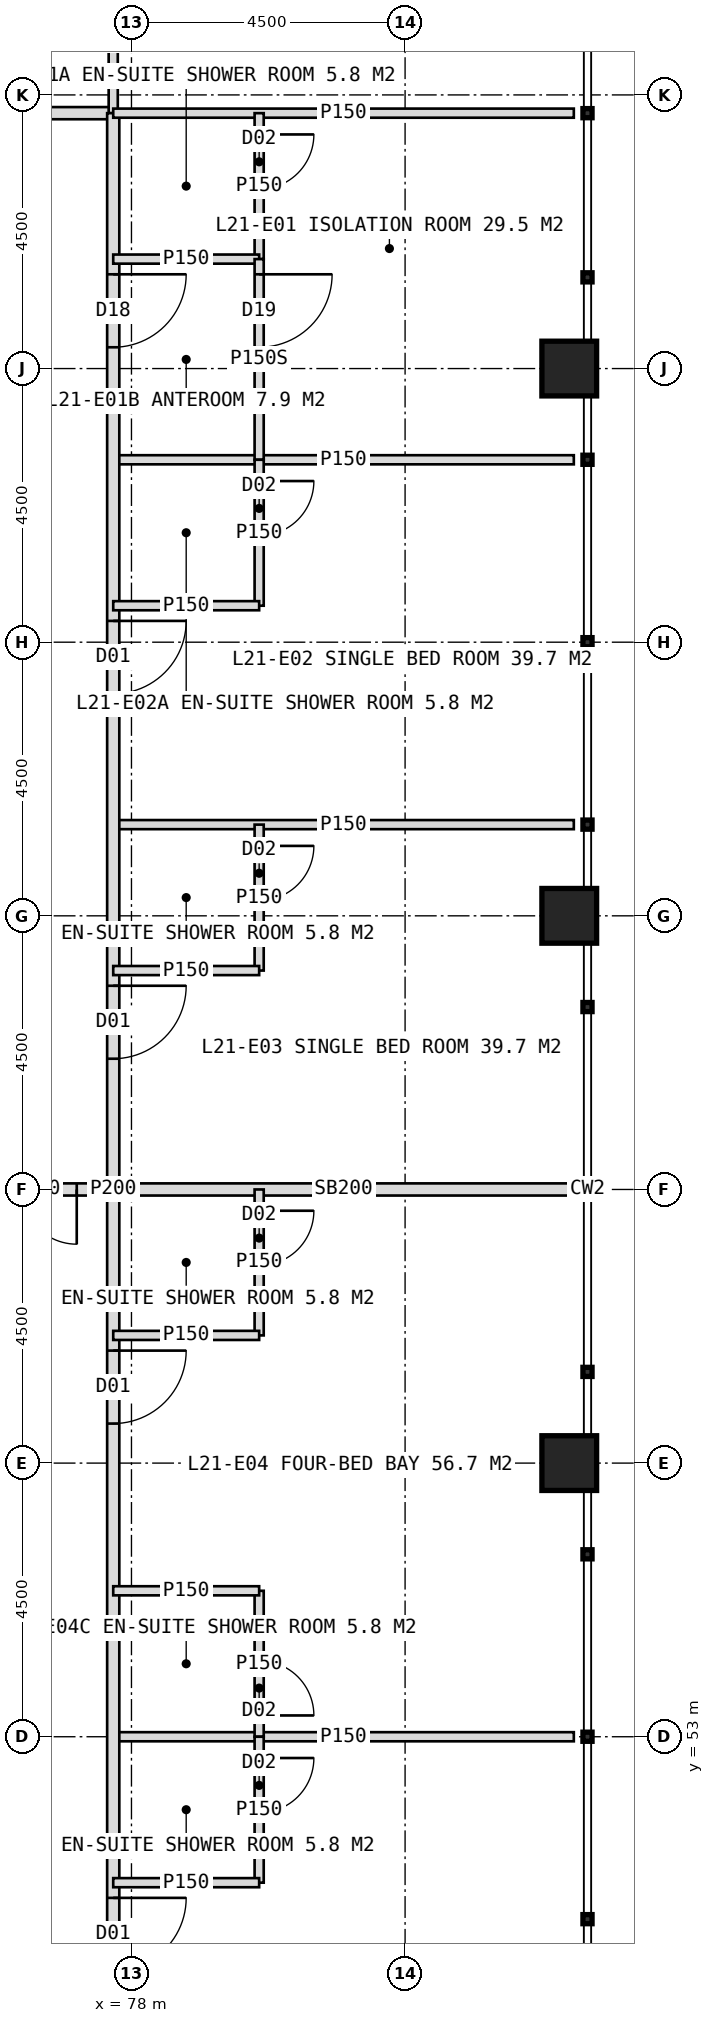
"""IFC4 building model, lengths in metres.
Left out: names, types, materials, properties, quantities, classifications, styles, units other than length and angle.
Written with IfcOpenShell. Run it as: python <this file> out.ifc"""

import sys

from ifc_helpers import new_model, si_unit, direction, frame, frame_2d, origin, origin_2d, place, context, subcontext, project, spatial, rectangle, hollow_rectangle, extrude, element, fill, save


model = new_model("IFC4")
c1 = context("Model", 3, precision=1e-05, world=origin(), true_north=direction((0.0, 1.0)))
c2 = subcontext(c1, "Body", "Model", "MODEL_VIEW")
j1 = project(units=[si_unit("LENGTHUNIT", "METRE"), si_unit("PLANEANGLEUNIT", "RADIAN")], contexts=[c1])
p1 = place(None, origin())
s1 = spatial("IfcSite", under=j1, at=p1, CompositionType="ELEMENT")
p2 = place(p1, origin())
s2 = spatial("IfcBuilding", under=s1, at=p2, CompositionType="ELEMENT")
p3 = place(p2, frame((0.0, 0.0, 91.0)))
s3 = spatial("IfcBuildingStorey", under=s2, at=p3, CompositionType="ELEMENT", Elevation=91.0)
for number, where, z_axis, x_axis in (
    (1, (85.2, 57.5, 0.0), (0.0, 0.0, 1.0), (1.0, 0.0, 0.0)),
    (2, (85.2, 66.5, 0.0), (0.0, 0.0, 1.0), (1.0, 0.0, 0.0)),
    (3, (85.2, 75.5, 0.0), (0.0, 0.0, 1.0), (1.0, 0.0, 0.0)),
):
    element("IfcColumn", number, at=place(p3, frame(where, z_axis=z_axis, x_axis=x_axis)), inside=s3, PredefinedType="COLUMN", context=c2, shape_type="SweptSolid", body=[
        extrude(hollow_rectangle(XDim=0.9, YDim=0.9, WallThickness=0.08, at=origin_2d()), origin(), (0.0, 0.0, 1.0), 4.0),
    ])
p4 = place(p3, frame((42.3, 79.7, 0.0), z_axis=(0.0, 0.0, 1.0), x_axis=(1.0, 0.0, 0.0)))
e4 = element("IfcWall", 4, at=p4, inside=s3, PredefinedType="PARTITIONING", context=c2, shape_type="SweptSolid", body=[
    extrude(rectangle(XDim=35.4, YDim=0.2, at=frame_2d((17.7, 0.0))), origin(), (0.0, 0.0, 1.0), 3.75),
])
p5 = place(p4, frame((2.65, 0.0, 0.0)))
e5 = element("IfcOpeningElement", 5, at=p5, cuts=e4, PredefinedType="OPENING", context=c2, shape_type="SweptSolid", body=[
    extrude(rectangle(XDim=1.2, YDim=2.2, at=frame_2d((0.6, 1.1))), frame((0.0, 0.11, 0.0), z_axis=(0.0, -1.0, 0.0), x_axis=(1.0, 0.0, 0.0)), (0.0, 0.0, 1.0), 0.22),
])
p6 = place(p4, frame((11.2, 0.0, 0.0)))
e6 = element("IfcOpeningElement", 6, at=p6, cuts=e4, PredefinedType="OPENING", context=c2, shape_type="SweptSolid", body=[
    extrude(rectangle(XDim=1.0, YDim=2.1, at=frame_2d((0.5, 1.05))), frame((0.0, 0.11, 0.0), z_axis=(0.0, -1.0, 0.0), x_axis=(1.0, 0.0, 0.0)), (0.0, 0.0, 1.0), 0.22),
])
p7 = place(p4, frame((17.2, 0.0, 0.0)))
e7 = element("IfcOpeningElement", 7, at=p7, cuts=e4, PredefinedType="OPENING", context=c2, shape_type="SweptSolid", body=[
    extrude(rectangle(XDim=1.0, YDim=2.1, at=frame_2d((0.5, 1.05))), frame((0.0, 0.11, 0.0), z_axis=(0.0, -1.0, 0.0), x_axis=(1.0, 0.0, 0.0)), (0.0, 0.0, 1.0), 0.22),
])
p8 = place(p4, frame((23.35, 0.0, 0.0)))
e8 = element("IfcOpeningElement", 8, at=p8, cuts=e4, PredefinedType="OPENING", context=c2, shape_type="SweptSolid", body=[
    extrude(rectangle(XDim=1.2, YDim=2.2, at=frame_2d((0.6, 1.1))), frame((0.0, 0.11, 0.0), z_axis=(0.0, -1.0, 0.0), x_axis=(1.0, 0.0, 0.0)), (0.0, 0.0, 1.0), 0.22),
])
p9 = place(p4, frame((29.35, 0.0, 0.0)))
e9 = element("IfcOpeningElement", 9, at=p9, cuts=e4, PredefinedType="OPENING", context=c2, shape_type="SweptSolid", body=[
    extrude(rectangle(XDim=1.2, YDim=2.2, at=frame_2d((0.6, 1.1))), frame((0.0, 0.11, 0.0), z_axis=(0.0, -1.0, 0.0), x_axis=(1.0, 0.0, 0.0)), (0.0, 0.0, 1.0), 0.22),
])
p10 = place(p3, frame((77.7, 79.7, 0.0), z_axis=(0.0, 0.0, 1.0), x_axis=(0.0, 1.0, 0.0)))
e10 = element("IfcWall", 10, at=p10, inside=s3, PredefinedType="PARTITIONING", context=c2, shape_type="SweptSolid", body=[
    extrude(rectangle(XDim=2.4, YDim=0.15, at=frame_2d((1.2, 0.0))), origin(), (0.0, 0.0, 1.0), 3.75),
])
for number, where, z_axis, x_axis in (
    (11, (77.7, 74.0, 0.0), (0.0, 0.0, 1.0), (1.0, 0.0, 0.0)),
    (12, (77.7, 68.0, 0.0), (0.0, 0.0, 1.0), (1.0, 0.0, 0.0)),
):
    element("IfcWall", number, at=place(p3, frame(where, z_axis=z_axis, x_axis=x_axis)), inside=s3, PredefinedType="PARTITIONING", context=c2, shape_type="SweptSolid", body=[
        extrude(rectangle(XDim=7.575, YDim=0.15, at=frame_2d((3.788, 0.0))), origin(), (0.0, 0.0, 1.0), 3.75),
    ])
p11 = place(p3, frame((77.7, 62.0, 0.0), z_axis=(0.0, 0.0, 1.0), x_axis=(1.0, 0.0, 0.0)))
e13 = element("IfcWall", 13, at=p11, inside=s3, PredefinedType="SOLIDWALL", context=c2, shape_type="SweptSolid", body=[
    extrude(rectangle(XDim=7.575, YDim=0.2, at=frame_2d((3.788, 0.0))), origin(), (0.0, 0.0, 1.0), 2.75),
])
p12 = place(p3, frame((77.7, 53.0, 0.0), z_axis=(0.0, 0.0, 1.0), x_axis=(1.0, 0.0, 0.0)))
e14 = element("IfcWall", 14, at=p12, inside=s3, PredefinedType="PARTITIONING", context=c2, shape_type="SweptSolid", body=[
    extrude(rectangle(XDim=7.575, YDim=0.15, at=frame_2d((3.788, 0.0))), origin(), (0.0, 0.0, 1.0), 3.75),
])
p13 = place(p3, frame((77.7, 79.7, 0.0), z_axis=(0.0, 0.0, 1.0), x_axis=(0.0, -1.0, 0.0)))
e15 = element("IfcWall", 15, at=p13, inside=s3, PredefinedType="PARTITIONING", context=c2, shape_type="SweptSolid", body=[
    extrude(rectangle(XDim=35.4, YDim=0.2, at=frame_2d((17.7, 0.0))), origin(), (0.0, 0.0, 1.0), 3.75),
])
p14 = place(p13, frame((2.65, 0.0, 0.0)))
e16 = element("IfcOpeningElement", 16, at=p14, cuts=e15, PredefinedType="OPENING", context=c2, shape_type="SweptSolid", body=[
    extrude(rectangle(XDim=1.2, YDim=2.2, at=frame_2d((0.6, 1.1))), frame((0.0, 0.11, 0.0), z_axis=(0.0, -1.0, 0.0), x_axis=(1.0, 0.0, 0.0)), (0.0, 0.0, 1.0), 0.22),
])
p15 = place(p13, frame((8.35, 0.0, 0.0)))
e17 = element("IfcOpeningElement", 17, at=p15, cuts=e15, PredefinedType="OPENING", context=c2, shape_type="SweptSolid", body=[
    extrude(rectangle(XDim=1.2, YDim=2.2, at=frame_2d((0.6, 1.1))), frame((0.0, 0.11, 0.0), z_axis=(0.0, -1.0, 0.0), x_axis=(1.0, 0.0, 0.0)), (0.0, 0.0, 1.0), 0.22),
])
p16 = place(p13, frame((14.35, 0.0, 0.0)))
e18 = element("IfcOpeningElement", 18, at=p16, cuts=e15, PredefinedType="OPENING", context=c2, shape_type="SweptSolid", body=[
    extrude(rectangle(XDim=1.2, YDim=2.2, at=frame_2d((0.6, 1.1))), frame((0.0, 0.11, 0.0), z_axis=(0.0, -1.0, 0.0), x_axis=(1.0, 0.0, 0.0)), (0.0, 0.0, 1.0), 0.22),
])
p17 = place(p13, frame((20.35, 0.0, 0.0)))
e19 = element("IfcOpeningElement", 19, at=p17, cuts=e15, PredefinedType="OPENING", context=c2, shape_type="SweptSolid", body=[
    extrude(rectangle(XDim=1.2, YDim=2.2, at=frame_2d((0.6, 1.1))), frame((0.0, 0.11, 0.0), z_axis=(0.0, -1.0, 0.0), x_axis=(1.0, 0.0, 0.0)), (0.0, 0.0, 1.0), 0.22),
])
p18 = place(p13, frame((29.35, 0.0, 0.0)))
e20 = element("IfcOpeningElement", 20, at=p18, cuts=e15, PredefinedType="OPENING", context=c2, shape_type="SweptSolid", body=[
    extrude(rectangle(XDim=1.2, YDim=2.2, at=frame_2d((0.6, 1.1))), frame((0.0, 0.11, 0.0), z_axis=(0.0, -1.0, 0.0), x_axis=(1.0, 0.0, 0.0)), (0.0, 0.0, 1.0), 0.22),
])
p19 = place(p3, frame((77.7, 79.7, 0.0), z_axis=(0.0, 0.0, 1.0), x_axis=(1.0, 0.0, 0.0)))
e21 = element("IfcWall", 21, at=p19, inside=s3, PredefinedType="PARTITIONING", context=c2, shape_type="SweptSolid", body=[
    extrude(rectangle(XDim=7.575, YDim=0.15, at=frame_2d((3.788, 0.0))), origin(), (0.0, 0.0, 1.0), 3.75),
])
p20 = place(p3, frame((80.1, 79.7, 0.0), z_axis=(0.0, 0.0, 1.0), x_axis=(0.0, -1.0, 0.0)))
e22 = element("IfcWall", 22, at=p20, inside=s3, PredefinedType="PARTITIONING", context=c2, shape_type="SweptSolid", body=[
    extrude(rectangle(XDim=2.4, YDim=0.15, at=frame_2d((1.2, 0.0))), origin(), (0.0, 0.0, 1.0), 3.75),
])
p21 = place(p20, frame((0.35, 0.0, 0.0)))
e23 = element("IfcOpeningElement", 23, at=p21, cuts=e22, PredefinedType="OPENING", context=c2, shape_type="SweptSolid", body=[
    extrude(rectangle(XDim=0.9, YDim=2.1, at=frame_2d((0.45, 1.05))), frame((0.0, 0.085, 0.0), z_axis=(0.0, -1.0, 0.0), x_axis=(1.0, 0.0, 0.0)), (0.0, 0.0, 1.0), 0.17),
])
p22 = place(p3, frame((77.7, 77.3, 0.0), z_axis=(0.0, 0.0, 1.0), x_axis=(1.0, 0.0, 0.0)))
e24 = element("IfcWall", 24, at=p22, inside=s3, PredefinedType="PARTITIONING", context=c2, shape_type="SweptSolid", body=[
    extrude(rectangle(XDim=2.4, YDim=0.15, at=frame_2d((1.2, 0.0))), origin(), (0.0, 0.0, 1.0), 3.75),
])
p23 = place(p3, frame((80.1, 77.3, 0.0), z_axis=(0.0, 0.0, 1.0), x_axis=(0.0, -1.0, 0.0)))
e25 = element("IfcWall", 25, at=p23, inside=s3, PredefinedType="PARTITIONING", context=c2, shape_type="SweptSolid", body=[
    extrude(rectangle(XDim=3.3, YDim=0.15, at=frame_2d((1.65, 0.0))), origin(), (0.0, 0.0, 1.0), 3.75),
])
p24 = place(p23, frame((0.25, 0.0, 0.0)))
e26 = element("IfcOpeningElement", 26, at=p24, cuts=e25, PredefinedType="OPENING", context=c2, shape_type="SweptSolid", body=[
    extrude(rectangle(XDim=1.2, YDim=2.2, at=frame_2d((0.6, 1.1))), frame((0.0, 0.085, 0.0), z_axis=(0.0, -1.0, 0.0), x_axis=(1.0, 0.0, 0.0)), (0.0, 0.0, 1.0), 0.17),
])
p25 = place(p3, frame((80.1, 74.0, 0.0), z_axis=(0.0, 0.0, 1.0), x_axis=(0.0, -1.0, 0.0)))
e27 = element("IfcWall", 27, at=p25, inside=s3, PredefinedType="PARTITIONING", context=c2, shape_type="SweptSolid", body=[
    extrude(rectangle(XDim=2.4, YDim=0.15, at=frame_2d((1.2, 0.0))), origin(), (0.0, 0.0, 1.0), 3.75),
])
p26 = place(p25, frame((0.35, 0.0, 0.0)))
e28 = element("IfcOpeningElement", 28, at=p26, cuts=e27, PredefinedType="OPENING", context=c2, shape_type="SweptSolid", body=[
    extrude(rectangle(XDim=0.9, YDim=2.1, at=frame_2d((0.45, 1.05))), frame((0.0, 0.085, 0.0), z_axis=(0.0, -1.0, 0.0), x_axis=(1.0, 0.0, 0.0)), (0.0, 0.0, 1.0), 0.17),
])
p27 = place(p3, frame((77.7, 71.6, 0.0), z_axis=(0.0, 0.0, 1.0), x_axis=(1.0, 0.0, 0.0)))
e29 = element("IfcWall", 29, at=p27, inside=s3, PredefinedType="PARTITIONING", context=c2, shape_type="SweptSolid", body=[
    extrude(rectangle(XDim=2.4, YDim=0.15, at=frame_2d((1.2, 0.0))), origin(), (0.0, 0.0, 1.0), 3.75),
])
p28 = place(p3, frame((80.1, 68.0, 0.0), z_axis=(0.0, 0.0, 1.0), x_axis=(0.0, -1.0, 0.0)))
e30 = element("IfcWall", 30, at=p28, inside=s3, PredefinedType="PARTITIONING", context=c2, shape_type="SweptSolid", body=[
    extrude(rectangle(XDim=2.4, YDim=0.15, at=frame_2d((1.2, 0.0))), origin(), (0.0, 0.0, 1.0), 3.75),
])
p29 = place(p28, frame((0.35, 0.0, 0.0)))
e31 = element("IfcOpeningElement", 31, at=p29, cuts=e30, PredefinedType="OPENING", context=c2, shape_type="SweptSolid", body=[
    extrude(rectangle(XDim=0.9, YDim=2.1, at=frame_2d((0.45, 1.05))), frame((0.0, 0.085, 0.0), z_axis=(0.0, -1.0, 0.0), x_axis=(1.0, 0.0, 0.0)), (0.0, 0.0, 1.0), 0.17),
])
p30 = place(p3, frame((77.7, 65.6, 0.0), z_axis=(0.0, 0.0, 1.0), x_axis=(1.0, 0.0, 0.0)))
e32 = element("IfcWall", 32, at=p30, inside=s3, PredefinedType="PARTITIONING", context=c2, shape_type="SweptSolid", body=[
    extrude(rectangle(XDim=2.4, YDim=0.15, at=frame_2d((1.2, 0.0))), origin(), (0.0, 0.0, 1.0), 3.75),
])
p31 = place(p3, frame((80.1, 62.0, 0.0), z_axis=(0.0, 0.0, 1.0), x_axis=(0.0, -1.0, 0.0)))
e33 = element("IfcWall", 33, at=p31, inside=s3, PredefinedType="PARTITIONING", context=c2, shape_type="SweptSolid", body=[
    extrude(rectangle(XDim=2.4, YDim=0.15, at=frame_2d((1.2, 0.0))), origin(), (0.0, 0.0, 1.0), 3.75),
])
p32 = place(p31, frame((0.35, 0.0, 0.0)))
e34 = element("IfcOpeningElement", 34, at=p32, cuts=e33, PredefinedType="OPENING", context=c2, shape_type="SweptSolid", body=[
    extrude(rectangle(XDim=0.9, YDim=2.1, at=frame_2d((0.45, 1.05))), frame((0.0, 0.085, 0.0), z_axis=(0.0, -1.0, 0.0), x_axis=(1.0, 0.0, 0.0)), (0.0, 0.0, 1.0), 0.17),
])
p33 = place(p3, frame((77.7, 59.6, 0.0), z_axis=(0.0, 0.0, 1.0), x_axis=(1.0, 0.0, 0.0)))
e35 = element("IfcWall", 35, at=p33, inside=s3, PredefinedType="PARTITIONING", context=c2, shape_type="SweptSolid", body=[
    extrude(rectangle(XDim=2.4, YDim=0.15, at=frame_2d((1.2, 0.0))), origin(), (0.0, 0.0, 1.0), 3.75),
])
p34 = place(p3, frame((80.1, 55.4, 0.0), z_axis=(0.0, 0.0, 1.0), x_axis=(0.0, -1.0, 0.0)))
e36 = element("IfcWall", 36, at=p34, inside=s3, PredefinedType="PARTITIONING", context=c2, shape_type="SweptSolid", body=[
    extrude(rectangle(XDim=2.4, YDim=0.15, at=frame_2d((1.2, 0.0))), origin(), (0.0, 0.0, 1.0), 3.75),
])
p35 = place(p34, frame((1.15, 0.0, 0.0)))
e37 = element("IfcOpeningElement", 37, at=p35, cuts=e36, PredefinedType="OPENING", context=c2, shape_type="SweptSolid", body=[
    extrude(rectangle(XDim=0.9, YDim=2.1, at=frame_2d((0.45, 1.05))), frame((0.0, 0.085, 0.0), z_axis=(0.0, -1.0, 0.0), x_axis=(1.0, 0.0, 0.0)), (0.0, 0.0, 1.0), 0.17),
])
p36 = place(p3, frame((77.7, 55.4, 0.0), z_axis=(0.0, 0.0, 1.0), x_axis=(1.0, 0.0, 0.0)))
e38 = element("IfcWall", 38, at=p36, inside=s3, PredefinedType="PARTITIONING", context=c2, shape_type="SweptSolid", body=[
    extrude(rectangle(XDim=2.4, YDim=0.15, at=frame_2d((1.2, 0.0))), origin(), (0.0, 0.0, 1.0), 3.75),
])
p37 = place(p3, frame((80.1, 53.0, 0.0), z_axis=(0.0, 0.0, 1.0), x_axis=(0.0, -1.0, 0.0)))
e39 = element("IfcWall", 39, at=p37, inside=s3, PredefinedType="PARTITIONING", context=c2, shape_type="SweptSolid", body=[
    extrude(rectangle(XDim=2.4, YDim=0.15, at=frame_2d((1.2, 0.0))), origin(), (0.0, 0.0, 1.0), 3.75),
])
p38 = place(p37, frame((0.35, 0.0, 0.0)))
e40 = element("IfcOpeningElement", 40, at=p38, cuts=e39, PredefinedType="OPENING", context=c2, shape_type="SweptSolid", body=[
    extrude(rectangle(XDim=0.9, YDim=2.1, at=frame_2d((0.45, 1.05))), frame((0.0, 0.085, 0.0), z_axis=(0.0, -1.0, 0.0), x_axis=(1.0, 0.0, 0.0)), (0.0, 0.0, 1.0), 0.17),
])
p39 = place(p3, frame((77.7, 50.6, 0.0), z_axis=(0.0, 0.0, 1.0), x_axis=(1.0, 0.0, 0.0)))
e41 = element("IfcWall", 41, at=p39, inside=s3, PredefinedType="PARTITIONING", context=c2, shape_type="SweptSolid", body=[
    extrude(rectangle(XDim=2.4, YDim=0.15, at=frame_2d((1.2, 0.0))), origin(), (0.0, 0.0, 1.0), 3.75),
])
p40 = place(p3, frame((75.0, 62.0, 0.0), z_axis=(0.0, 0.0, 1.0), x_axis=(1.0, 0.0, 0.0)))
e42 = element("IfcWall", 42, at=p40, inside=s3, PredefinedType="SOLIDWALL", context=c2, shape_type="SweptSolid", body=[
    extrude(rectangle(XDim=2.7, YDim=0.2, at=frame_2d((1.35, 0.0))), origin(), (0.0, 0.0, 1.0), 2.75),
])
p41 = place(p40, frame((0.3, 0.0, 0.0)))
e43 = element("IfcOpeningElement", 43, at=p41, cuts=e42, PredefinedType="OPENING", context=c2, shape_type="SweptSolid", body=[
    extrude(rectangle(XDim=1.8, YDim=2.2, at=frame_2d((0.9, 1.1))), frame((0.0, 0.11, 0.0), z_axis=(0.0, -1.0, 0.0), x_axis=(1.0, 0.0, 0.0)), (0.0, 0.0, 1.0), 0.22),
])
p42 = place(p24, origin())
e44 = element("IfcDoor", 44, at=p42, inside=s3, OperationType="SINGLE_SWING_LEFT", PredefinedType="DOOR", context=c2, shape_type="SweptSolid", body=[
    extrude(rectangle(XDim=1.2, YDim=2.2, at=frame_2d((0.6, 1.1))), frame((0.0, 0.025, 0.0), z_axis=(0.0, -1.0, 0.0), x_axis=(1.0, 0.0, 0.0)), (0.0, 0.0, 1.0), 0.05),
])
fill(e26, e44)
p43 = place(p14, origin())
e45 = element("IfcDoor", 45, at=p43, inside=s3, OperationType="SINGLE_SWING_LEFT", PredefinedType="DOOR", context=c2, shape_type="SweptSolid", body=[
    extrude(rectangle(XDim=1.2, YDim=2.2, at=frame_2d((0.6, 1.1))), frame((0.0, 0.025, 0.0), z_axis=(0.0, -1.0, 0.0), x_axis=(1.0, 0.0, 0.0)), (0.0, 0.0, 1.0), 0.05),
])
fill(e16, e45)
p44 = place(p21, origin())
e46 = element("IfcDoor", 46, at=p44, inside=s3, OperationType="SINGLE_SWING_LEFT", PredefinedType="DOOR", context=c2, shape_type="SweptSolid", body=[
    extrude(rectangle(XDim=0.9, YDim=2.1, at=frame_2d((0.45, 1.05))), frame((0.0, 0.025, 0.0), z_axis=(0.0, -1.0, 0.0), x_axis=(1.0, 0.0, 0.0)), (0.0, 0.0, 1.0), 0.05),
])
fill(e23, e46)
p45 = place(p15, origin())
e47 = element("IfcDoor", 47, at=p45, inside=s3, OperationType="SINGLE_SWING_LEFT", PredefinedType="DOOR", context=c2, shape_type="SweptSolid", body=[
    extrude(rectangle(XDim=1.2, YDim=2.2, at=frame_2d((0.6, 1.1))), frame((0.0, 0.025, 0.0), z_axis=(0.0, -1.0, 0.0), x_axis=(1.0, 0.0, 0.0)), (0.0, 0.0, 1.0), 0.05),
])
fill(e17, e47)
p46 = place(p26, origin())
e48 = element("IfcDoor", 48, at=p46, inside=s3, OperationType="SINGLE_SWING_LEFT", PredefinedType="DOOR", context=c2, shape_type="SweptSolid", body=[
    extrude(rectangle(XDim=0.9, YDim=2.1, at=frame_2d((0.45, 1.05))), frame((0.0, 0.025, 0.0), z_axis=(0.0, -1.0, 0.0), x_axis=(1.0, 0.0, 0.0)), (0.0, 0.0, 1.0), 0.05),
])
fill(e28, e48)
p47 = place(p16, origin())
e49 = element("IfcDoor", 49, at=p47, inside=s3, OperationType="SINGLE_SWING_LEFT", PredefinedType="DOOR", context=c2, shape_type="SweptSolid", body=[
    extrude(rectangle(XDim=1.2, YDim=2.2, at=frame_2d((0.6, 1.1))), frame((0.0, 0.025, 0.0), z_axis=(0.0, -1.0, 0.0), x_axis=(1.0, 0.0, 0.0)), (0.0, 0.0, 1.0), 0.05),
])
fill(e18, e49)
p48 = place(p29, origin())
e50 = element("IfcDoor", 50, at=p48, inside=s3, OperationType="SINGLE_SWING_LEFT", PredefinedType="DOOR", context=c2, shape_type="SweptSolid", body=[
    extrude(rectangle(XDim=0.9, YDim=2.1, at=frame_2d((0.45, 1.05))), frame((0.0, 0.025, 0.0), z_axis=(0.0, -1.0, 0.0), x_axis=(1.0, 0.0, 0.0)), (0.0, 0.0, 1.0), 0.05),
])
fill(e31, e50)
p49 = place(p17, origin())
e51 = element("IfcDoor", 51, at=p49, inside=s3, OperationType="SINGLE_SWING_LEFT", PredefinedType="DOOR", context=c2, shape_type="SweptSolid", body=[
    extrude(rectangle(XDim=1.2, YDim=2.2, at=frame_2d((0.6, 1.1))), frame((0.0, 0.025, 0.0), z_axis=(0.0, -1.0, 0.0), x_axis=(1.0, 0.0, 0.0)), (0.0, 0.0, 1.0), 0.05),
])
fill(e19, e51)
p50 = place(p32, origin())
e52 = element("IfcDoor", 52, at=p50, inside=s3, OperationType="SINGLE_SWING_LEFT", PredefinedType="DOOR", context=c2, shape_type="SweptSolid", body=[
    extrude(rectangle(XDim=0.9, YDim=2.1, at=frame_2d((0.45, 1.05))), frame((0.0, 0.025, 0.0), z_axis=(0.0, -1.0, 0.0), x_axis=(1.0, 0.0, 0.0)), (0.0, 0.0, 1.0), 0.05),
])
fill(e34, e52)
p51 = place(p35, origin())
e53 = element("IfcDoor", 53, at=p51, inside=s3, OperationType="SINGLE_SWING_RIGHT", PredefinedType="DOOR", context=c2, shape_type="SweptSolid", body=[
    extrude(rectangle(XDim=0.9, YDim=2.1, at=frame_2d((0.45, 1.05))), frame((0.0, 0.025, 0.0), z_axis=(0.0, -1.0, 0.0), x_axis=(1.0, 0.0, 0.0)), (0.0, 0.0, 1.0), 0.05),
])
fill(e37, e53)
p52 = place(p18, origin())
e54 = element("IfcDoor", 54, at=p52, inside=s3, OperationType="SINGLE_SWING_LEFT", PredefinedType="DOOR", context=c2, shape_type="SweptSolid", body=[
    extrude(rectangle(XDim=1.2, YDim=2.2, at=frame_2d((0.6, 1.1))), frame((0.0, 0.025, 0.0), z_axis=(0.0, -1.0, 0.0), x_axis=(1.0, 0.0, 0.0)), (0.0, 0.0, 1.0), 0.05),
])
fill(e20, e54)
p53 = place(p38, origin())
e55 = element("IfcDoor", 55, at=p53, inside=s3, OperationType="SINGLE_SWING_LEFT", PredefinedType="DOOR", context=c2, shape_type="SweptSolid", body=[
    extrude(rectangle(XDim=0.9, YDim=2.1, at=frame_2d((0.45, 1.05))), frame((0.0, 0.025, 0.0), z_axis=(0.0, -1.0, 0.0), x_axis=(1.0, 0.0, 0.0)), (0.0, 0.0, 1.0), 0.05),
])
fill(e40, e55)
p54 = place(p41, origin())
e56 = element("IfcDoor", 56, at=p54, inside=s3, OperationType="DOUBLE_DOOR_DOUBLE_SWING", PredefinedType="DOOR", context=c2, shape_type="SweptSolid", body=[
    extrude(rectangle(XDim=1.8, YDim=2.2, at=frame_2d((0.9, 1.1))), frame((0.0, 0.025, 0.0), z_axis=(0.0, -1.0, 0.0), x_axis=(1.0, 0.0, 0.0)), (0.0, 0.0, 1.0), 0.05),
])
fill(e43, e56)
save(model, sys.argv[1])
